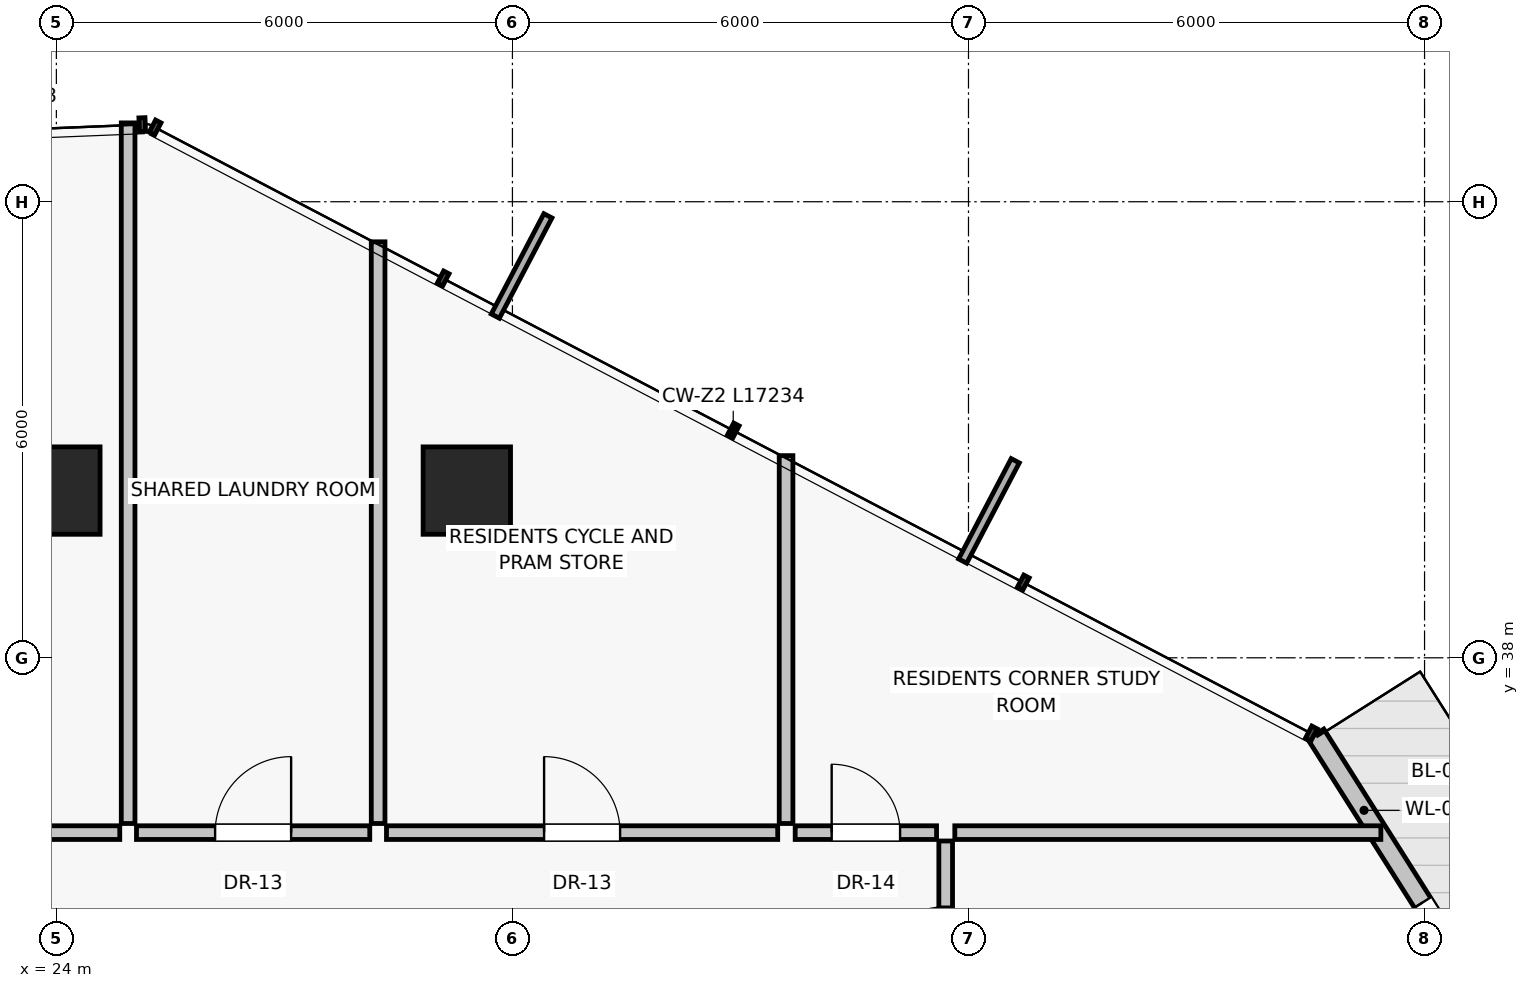
"""IFC4 building model, lengths in metres.
Left out: names, types, materials, properties, quantities, classifications, styles, units other than length and angle.
Written with IfcOpenShell. Run it as: python <this file> out.ifc"""

import sys

from ifc_helpers import new_model, si_unit, direction, frame, frame_2d, origin, origin_2d, place, context, subcontext, project, spatial, rectangle, extrude, source, transform, mapped, element, fill, save


model = new_model("IFC4")
c1 = context("Model", 3, precision=1e-05, world=origin(), true_north=direction((0.0, 1.0)))
c2 = subcontext(c1, "Body", "Model", "MODEL_VIEW")
j1 = project(units=[si_unit("LENGTHUNIT", "METRE"), si_unit("PLANEANGLEUNIT", "RADIAN")], contexts=[c1])
p1 = place(None, origin())
s1 = spatial("IfcSite", under=j1, at=p1, CompositionType="ELEMENT")
p2 = place(p1, origin())
s2 = spatial("IfcBuilding", under=s1, at=p2, CompositionType="ELEMENT")
p3 = place(p2, frame((0.0, 0.0, 136.0)))
s3 = spatial("IfcBuildingStorey", under=s2, at=p3, CompositionType="ELEMENT", Elevation=136.0)
for number, where, z_axis, x_axis in (
    (1, (29.4, 40.2, 0.0), (0.0, 0.0, 1.0), (1.0, 0.0, 0.0)),
    (2, (24.0, 40.2, 0.0), (0.0, 0.0, 1.0), (1.0, 0.0, 0.0)),
):
    element("IfcColumn", number, at=place(p3, frame(where, z_axis=z_axis, x_axis=x_axis)), inside=s3, PredefinedType="COLUMN", context=c2, shape_type="SweptSolid", body=[
        extrude(rectangle(XDim=1.15, YDim=1.15, at=origin_2d()), origin(), (0.0, 0.0, 1.0), 3.25),
    ])
p4 = place(p3, frame((42.833, 33.419, 0.0), z_axis=(0.0, 0.0, 1.0), x_axis=(-0.534940933302, 0.84488945897, 0.0)))
e3 = element("IfcWall", 3, at=p4, inside=s3, PredefinedType="SOLIDWALL", context=c2, shape_type="SweptSolid", body=[
    extrude(rectangle(XDim=4.233, YDim=0.25, at=frame_2d((2.116, 0.0))), origin(), (0.0, 0.0, 1.0), 3.0),
])
p5 = place(p4, frame((0.46, 0.0, 0.0)))
e4 = element("IfcOpeningElement", 4, at=p5, cuts=e3, PredefinedType="OPENING", context=c2, shape_type="SweptSolid", body=[
    extrude(rectangle(XDim=1.15, YDim=2.25, at=frame_2d((0.575, 1.125))), frame((0.0, 0.135, 0.0), z_axis=(0.0, -1.0, 0.0), x_axis=(1.0, 0.0, 0.0)), (0.0, 0.0, 1.0), 0.27),
])
p6 = place(p3, frame((33.6, 35.82, 0.0), z_axis=(0.0, 0.0, 1.0), x_axis=(0.0, 1.0, 0.0)))
e5 = element("IfcWall", 5, at=p6, inside=s3, PredefinedType="PARTITIONING", context=c2, shape_type="SweptSolid", body=[
    extrude(rectangle(XDim=4.84, YDim=0.18, at=frame_2d((2.42, 0.0))), origin(), (0.0, 0.0, 1.0), 3.0),
])
p7 = place(p3, frame((18.517, 35.7, 0.0), z_axis=(0.0, 0.0, 1.0), x_axis=(1.0, 0.0, 0.0)))
e6 = element("IfcWall", 6, at=p7, inside=s3, PredefinedType="PARTITIONING", context=c2, shape_type="SweptSolid", body=[
    extrude(rectangle(XDim=6.317, YDim=0.18, at=frame_2d((3.158, 0.0))), origin(), (0.0, 0.0, 1.0), 2.58),
])
p8 = place(p7, frame((2.658, 0.0, 0.0)))
e7 = element("IfcOpeningElement", 7, at=p8, cuts=e6, PredefinedType="OPENING", context=c2, shape_type="SweptSolid", body=[
    extrude(rectangle(XDim=1.0, YDim=2.01, at=frame_2d((0.5, 1.005))), frame((0.0, 0.1, 0.0), z_axis=(0.0, -1.0, 0.0), x_axis=(1.0, 0.0, 0.0)), (0.0, 0.0, 1.0), 0.2),
])
p9 = place(p3, frame((24.944, 35.82, 0.0), z_axis=(0.0, 0.0, 1.0), x_axis=(0.0, 1.0, 0.0)))
e8 = element("IfcWall", 8, at=p9, inside=s3, PredefinedType="PARTITIONING", context=c2, shape_type="SweptSolid", body=[
    extrude(rectangle(XDim=9.217, YDim=0.18, at=frame_2d((4.608, 0.0))), origin(), (0.0, 0.0, 1.0), 3.0),
])
p10 = place(p3, frame((25.054, 35.7, 0.0), z_axis=(0.0, 0.0, 1.0), x_axis=(1.0, 0.0, 0.0)))
e9 = element("IfcWall", 9, at=p10, inside=s3, PredefinedType="PARTITIONING", context=c2, shape_type="SweptSolid", body=[
    extrude(rectangle(XDim=3.069, YDim=0.18, at=frame_2d((1.535, 0.0))), origin(), (0.0, 0.0, 1.0), 2.58),
])
p11 = place(p10, frame((1.034, 0.0, 0.0)))
e10 = element("IfcOpeningElement", 10, at=p11, cuts=e9, PredefinedType="OPENING", context=c2, shape_type="SweptSolid", body=[
    extrude(rectangle(XDim=1.0, YDim=2.01, at=frame_2d((0.5, 1.005))), frame((0.0, 0.1, 0.0), z_axis=(0.0, -1.0, 0.0), x_axis=(1.0, 0.0, 0.0)), (0.0, 0.0, 1.0), 0.2),
])
p12 = place(p3, frame((28.343, 35.7, 0.0), z_axis=(0.0, 0.0, 1.0), x_axis=(1.0, 0.0, 0.0)))
e11 = element("IfcWall", 11, at=p12, inside=s3, PredefinedType="PARTITIONING", context=c2, shape_type="SweptSolid", body=[
    extrude(rectangle(XDim=5.147, YDim=0.18, at=frame_2d((2.573, 0.0))), origin(), (0.0, 0.0, 1.0), 2.58),
])
p13 = place(p12, frame((2.073, 0.0, 0.0)))
e12 = element("IfcOpeningElement", 12, at=p13, cuts=e11, PredefinedType="OPENING", context=c2, shape_type="SweptSolid", body=[
    extrude(rectangle(XDim=1.0, YDim=2.01, at=frame_2d((0.5, 1.005))), frame((0.0, 0.1, 0.0), z_axis=(0.0, -1.0, 0.0), x_axis=(1.0, 0.0, 0.0)), (0.0, 0.0, 1.0), 0.2),
])
p14 = place(p3, frame((28.233, 35.82, 0.0), z_axis=(0.0, 0.0, 1.0), x_axis=(0.0, 1.0, 0.0)))
e13 = element("IfcWall", 13, at=p14, inside=s3, PredefinedType="PARTITIONING", context=c2, shape_type="SweptSolid", body=[
    extrude(rectangle(XDim=7.653, YDim=0.18, at=frame_2d((3.826, 0.0))), origin(), (0.0, 0.0, 1.0), 3.0),
])
p15 = place(p3, frame((35.82, 35.7, 0.0), z_axis=(0.0, 0.0, 1.0), x_axis=(1.0, 0.0, 0.0)))
e14 = element("IfcWall", 14, at=p15, inside=s3, PredefinedType="PARTITIONING", context=c2, shape_type="SweptSolid", body=[
    extrude(rectangle(XDim=5.605, YDim=0.18, at=frame_2d((2.802, 0.0))), origin(), (0.0, 0.0, 1.0), 3.0),
])
p16 = place(p3, frame((35.7, 32.86, 0.0), z_axis=(0.0, 0.0, 1.0), x_axis=(0.0, 1.0, 0.0)))
e15 = element("IfcWall", 15, at=p16, inside=s3, PredefinedType="PARTITIONING", context=c2, shape_type="SweptSolid", body=[
    extrude(rectangle(XDim=2.73, YDim=0.18, at=frame_2d((1.365, 0.0))), origin(), (0.0, 0.0, 1.0), 3.0),
])
p17 = place(p16, frame((0.865, 0.0, 0.0)))
e16 = element("IfcOpeningElement", 16, at=p17, cuts=e15, PredefinedType="OPENING", context=c2, shape_type="SweptSolid", body=[
    extrude(rectangle(XDim=1.0, YDim=2.01, at=frame_2d((0.5, 1.005))), frame((0.0, 0.1, 0.0), z_axis=(0.0, -1.0, 0.0), x_axis=(1.0, 0.0, 0.0)), (0.0, 0.0, 1.0), 0.2),
])
p18 = place(p3, frame((33.72, 35.7, 0.0), z_axis=(0.0, 0.0, 1.0), x_axis=(1.0, 0.0, 0.0)))
e17 = element("IfcWall", 17, at=p18, inside=s3, PredefinedType="PARTITIONING", context=c2, shape_type="SweptSolid", body=[
    extrude(rectangle(XDim=1.86, YDim=0.18, at=frame_2d((0.93, 0.0))), origin(), (0.0, 0.0, 1.0), 3.0),
])
p19 = place(p18, frame((0.48, 0.0, 0.0)))
e18 = element("IfcOpeningElement", 18, at=p19, cuts=e17, PredefinedType="OPENING", context=c2, shape_type="SweptSolid", body=[
    extrude(rectangle(XDim=0.9, YDim=2.01, at=frame_2d((0.45, 1.005))), frame((0.0, 0.1, 0.0), z_axis=(0.0, -1.0, 0.0), x_axis=(1.0, 0.0, 0.0)), (0.0, 0.0, 1.0), 0.2),
])
m1 = source(origin(), c2, "Body", "SweptSolid", [
    extrude(rectangle(XDim=1.15, YDim=2.25, at=frame_2d((0.575, 1.125))), frame((0.0, 0.025, 0.0), z_axis=(0.0, -1.0, 0.0), x_axis=(1.0, 0.0, 0.0)), (0.0, 0.0, 1.0), 0.05),
])
p20 = place(p5, frame((1.15, 0.0, 0.0), z_axis=(0.0, 0.0, 1.0), x_axis=(-1.0, 0.0, 0.0)))
e19 = element("IfcDoor", 19, at=p20, inside=s3, OperationType="SINGLE_SWING_RIGHT", PredefinedType="DOOR", context=c2, shape_type="MappedRepresentation", body=[
    mapped(m1, transform((0.0, 0.0, 0.0), scale=1.0)),
])
fill(e4, e19)
m2 = source(origin(), c2, "Body", "SweptSolid", [
    extrude(rectangle(XDim=1.0, YDim=2.01, at=frame_2d((0.5, 1.005))), frame((0.0, 0.025, 0.0), z_axis=(0.0, -1.0, 0.0), x_axis=(1.0, 0.0, 0.0)), (0.0, 0.0, 1.0), 0.05),
])
p21 = place(p11, origin())
e20 = element("IfcDoor", 20, at=p21, inside=s3, OperationType="SINGLE_SWING_RIGHT", PredefinedType="DOOR", context=c2, shape_type="MappedRepresentation", body=[
    mapped(m2, transform((0.0, 0.0, 0.0), scale=1.0)),
])
fill(e10, e20)
p22 = place(p13, origin())
e21 = element("IfcDoor", 21, at=p22, inside=s3, OperationType="SINGLE_SWING_LEFT", PredefinedType="DOOR", context=c2, shape_type="MappedRepresentation", body=[
    mapped(m2, transform((0.0, 0.0, 0.0), scale=1.0)),
])
fill(e12, e21)
p23 = place(p17, origin())
e22 = element("IfcDoor", 22, at=p23, inside=s3, OperationType="SINGLE_SWING_LEFT", PredefinedType="DOOR", context=c2, shape_type="MappedRepresentation", body=[
    mapped(m2, transform((0.0, 0.0, 0.0), scale=1.0)),
])
fill(e16, e22)
m3 = source(origin(), c2, "Body", "SweptSolid", [
    extrude(rectangle(XDim=0.9, YDim=2.01, at=frame_2d((0.45, 1.005))), frame((0.0, 0.025, 0.0), z_axis=(0.0, -1.0, 0.0), x_axis=(1.0, 0.0, 0.0)), (0.0, 0.0, 1.0), 0.05),
])
p24 = place(p19, origin())
e23 = element("IfcDoor", 23, at=p24, inside=s3, OperationType="SINGLE_SWING_LEFT", PredefinedType="DOOR", context=c2, shape_type="MappedRepresentation", body=[
    mapped(m3, transform((0.0, 0.0, 0.0), scale=1.0)),
])
fill(e18, e23)
save(model, sys.argv[1])
